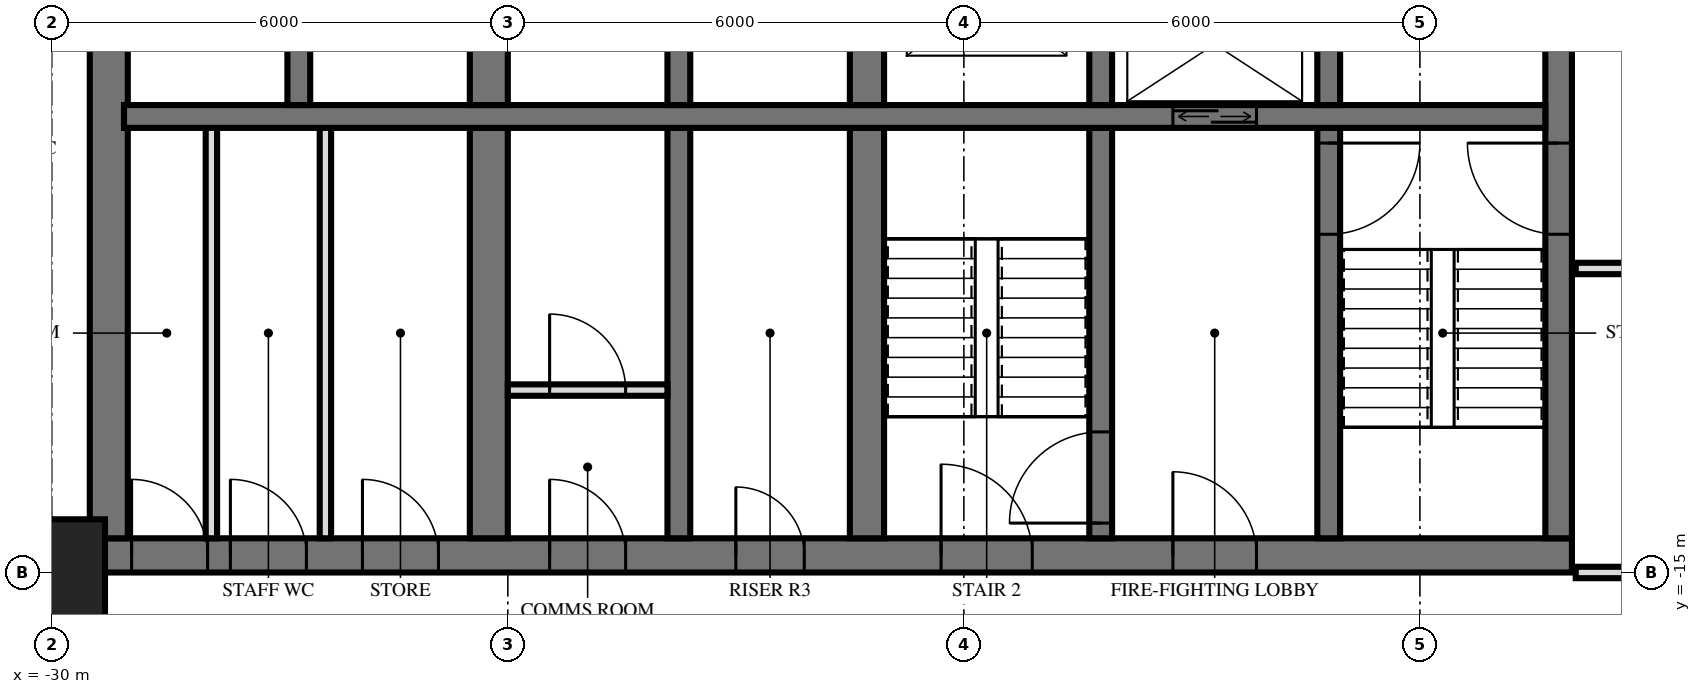
"""IFC4 building model, lengths in metres.
Left out: names, types, materials, properties, quantities, classifications, styles, units other than length and angle.
Written with IfcOpenShell. Run it as: python <this file> out.ifc"""

import sys

from ifc_helpers import new_model, si_unit, direction, frame, frame_2d, origin, origin_2d, place, context, subcontext, project, spatial, rectangle, extrude, element, fill, save


model = new_model("IFC4")
c1 = context("Model", 3, precision=1e-05, world=origin(), true_north=direction((0.0, 1.0)))
c2 = subcontext(c1, "Body", "Model", "MODEL_VIEW")
j1 = project(units=[si_unit("LENGTHUNIT", "METRE"), si_unit("PLANEANGLEUNIT", "RADIAN")], contexts=[c1])
p1 = place(None, origin())
s1 = spatial("IfcSite", under=j1, at=p1, CompositionType="ELEMENT")
p2 = place(p1, origin())
s2 = spatial("IfcBuilding", under=s1, at=p2, CompositionType="ELEMENT")
p3 = place(p2, frame((0.0, 0.0, 88.8)))
s3 = spatial("IfcBuildingStorey", under=s2, at=p3, CompositionType="ELEMENT", Elevation=88.8)
p4 = place(p3, frame((-30.0, -15.0, 0.0), z_axis=(0.0, 0.0, 1.0), x_axis=(1.0, 0.0, 0.0)))
e1 = element("IfcColumn", 1, at=p4, inside=s3, PredefinedType="COLUMN", context=c2, shape_type="SweptSolid", body=[
    extrude(rectangle(XDim=1.4, YDim=1.4, at=origin_2d()), origin(), (0.0, 0.0, 1.0), 3.6),
])
p5 = place(p3, frame((-29.5, -14.775, 0.0), z_axis=(0.0, 0.0, 1.0), x_axis=(1.0, 0.0, 0.0)))
e2 = element("IfcWall", 2, at=p5, inside=s3, PredefinedType="SHEAR", context=c2, shape_type="SweptSolid", body=[
    extrude(rectangle(XDim=19.5, YDim=0.45, at=frame_2d((9.75, 0.0))), origin(), (0.0, 0.0, 1.0), 3.6),
])
p6 = place(p5, frame((11.2, 0.0, 0.0)))
e3 = element("IfcOpeningElement", 3, at=p6, cuts=e2, PredefinedType="OPENING", context=c2, shape_type="SweptSolid", body=[
    extrude(rectangle(XDim=1.2, YDim=2.1, at=frame_2d((0.6, 1.05))), frame((0.0, 0.235, 0.0), z_axis=(0.0, -1.0, 0.0), x_axis=(1.0, 0.0, 0.0)), (0.0, 0.0, 1.0), 0.47),
])
p7 = place(p5, frame((14.25, 0.0, 0.0)))
e4 = element("IfcOpeningElement", 4, at=p7, cuts=e2, PredefinedType="OPENING", context=c2, shape_type="SweptSolid", body=[
    extrude(rectangle(XDim=1.1, YDim=2.1, at=frame_2d((0.55, 1.05))), frame((0.0, 0.235, 0.0), z_axis=(0.0, -1.0, 0.0), x_axis=(1.0, 0.0, 0.0)), (0.0, 0.0, 1.0), 0.47),
])
p8 = place(p5, frame((8.5, 0.0, 0.0)))
e5 = element("IfcOpeningElement", 5, at=p8, cuts=e2, PredefinedType="OPENING", context=c2, shape_type="SweptSolid", body=[
    extrude(rectangle(XDim=0.9, YDim=2.1, at=frame_2d((0.45, 1.05))), frame((0.0, 0.235, 0.0), z_axis=(0.0, -1.0, 0.0), x_axis=(1.0, 0.0, 0.0)), (0.0, 0.0, 1.0), 0.47),
])
p9 = place(p5, frame((6.05, 0.0, 0.0)))
e6 = element("IfcOpeningElement", 6, at=p9, cuts=e2, PredefinedType="OPENING", context=c2, shape_type="SweptSolid", body=[
    extrude(rectangle(XDim=1.0, YDim=2.1, at=frame_2d((0.5, 1.05))), frame((0.0, 0.235, 0.0), z_axis=(0.0, -1.0, 0.0), x_axis=(1.0, 0.0, 0.0)), (0.0, 0.0, 1.0), 0.47),
])
p10 = place(p5, frame((3.587, 0.0, 0.0)))
e7 = element("IfcOpeningElement", 7, at=p10, cuts=e2, PredefinedType="OPENING", context=c2, shape_type="SweptSolid", body=[
    extrude(rectangle(XDim=1.0, YDim=2.1, at=frame_2d((0.5, 1.05))), frame((0.0, 0.235, 0.0), z_axis=(0.0, -1.0, 0.0), x_axis=(1.0, 0.0, 0.0)), (0.0, 0.0, 1.0), 0.47),
])
p11 = place(p5, frame((1.85, 0.0, 0.0)))
e8 = element("IfcOpeningElement", 8, at=p11, cuts=e2, PredefinedType="OPENING", context=c2, shape_type="SweptSolid", body=[
    extrude(rectangle(XDim=1.0, YDim=2.1, at=frame_2d((0.5, 1.05))), frame((0.0, 0.235, 0.0), z_axis=(0.0, -1.0, 0.0), x_axis=(1.0, 0.0, 0.0)), (0.0, 0.0, 1.0), 0.47),
])
p12 = place(p5, frame((0.55, 0.0, 0.0)))
e9 = element("IfcOpeningElement", 9, at=p12, cuts=e2, PredefinedType="OPENING", context=c2, shape_type="SweptSolid", body=[
    extrude(rectangle(XDim=1.0, YDim=2.1, at=frame_2d((0.5, 1.05))), frame((0.0, 0.235, 0.0), z_axis=(0.0, -1.0, 0.0), x_axis=(1.0, 0.0, 0.0)), (0.0, 0.0, 1.0), 0.47),
])
p13 = place(p3, frame((-10.175, -14.55, 0.0), z_axis=(0.0, 0.0, 1.0), x_axis=(0.0, 1.0, 0.0)))
e10 = element("IfcWall", 10, at=p13, inside=s3, PredefinedType="SHEAR", context=c2, shape_type="SweptSolid", body=[
    extrude(rectangle(XDim=14.1, YDim=0.35, at=frame_2d((7.05, 0.0))), origin(), (0.0, 0.0, 1.0), 3.6),
])
p14 = place(p13, frame((8.4, 0.0, 0.0)))
e11 = element("IfcOpeningElement", 11, at=p14, cuts=e10, PredefinedType="OPENING", context=c2, shape_type="SweptSolid", body=[
    extrude(rectangle(XDim=1.4, YDim=2.4, at=frame_2d((0.7, 1.2))), frame((0.0, 0.185, 0.0), z_axis=(0.0, -1.0, 0.0), x_axis=(1.0, 0.0, 0.0)), (0.0, 0.0, 1.0), 0.37),
])
p15 = place(p13, frame((10.0, 0.0, 0.0)))
e12 = element("IfcOpeningElement", 12, at=p15, cuts=e10, PredefinedType="OPENING", context=c2, shape_type="SweptSolid", body=[
    extrude(rectangle(XDim=1.4, YDim=2.4, at=frame_2d((0.7, 1.2))), frame((0.0, 0.185, 0.0), z_axis=(0.0, -1.0, 0.0), x_axis=(1.0, 0.0, 0.0)), (0.0, 0.0, 1.0), 0.37),
])
p16 = place(p13, frame((4.0, 0.0, 0.0)))
e13 = element("IfcOpeningElement", 13, at=p16, cuts=e10, PredefinedType="OPENING", context=c2, shape_type="SweptSolid", body=[
    extrude(rectangle(XDim=1.2, YDim=2.1, at=frame_2d((0.6, 1.05))), frame((0.0, 0.185, 0.0), z_axis=(0.0, -1.0, 0.0), x_axis=(1.0, 0.0, 0.0)), (0.0, 0.0, 1.0), 0.37),
])
p17 = place(p3, frame((-29.25, -14.55, 0.0), z_axis=(0.0, 0.0, 1.0), x_axis=(0.0, 1.0, 0.0)))
e14 = element("IfcWall", 14, at=p17, inside=s3, PredefinedType="SHEAR", context=c2, shape_type="SweptSolid", body=[
    extrude(rectangle(XDim=14.1, YDim=0.5, at=frame_2d((7.05, 0.0))), origin(), (0.0, 0.0, 1.0), 3.6),
])
p18 = place(p3, frame((-29.05, -9.0, 0.0), z_axis=(0.0, 0.0, 1.0), x_axis=(1.0, 0.0, 0.0)))
e15 = element("IfcWall", 15, at=p18, inside=s3, PredefinedType="SHEAR", context=c2, shape_type="SweptSolid", body=[
    extrude(rectangle(XDim=18.7, YDim=0.3, at=frame_2d((9.35, 0.0))), origin(), (0.0, 0.0, 1.0), 3.6),
])
p19 = place(p18, frame((13.8, 0.0, 0.0)))
e16 = element("IfcOpeningElement", 16, at=p19, cuts=e15, PredefinedType="OPENING", context=c2, shape_type="SweptSolid", body=[
    extrude(rectangle(XDim=1.1, YDim=2.1, at=frame_2d((0.55, 1.05))), frame((0.0, 0.16, 0.0), z_axis=(0.0, -1.0, 0.0), x_axis=(1.0, 0.0, 0.0)), (0.0, 0.0, 1.0), 0.32),
])
p20 = place(p3, frame((-13.2, -8.85, 0.0), z_axis=(0.0, 0.0, 1.0), x_axis=(0.0, 1.0, 0.0)))
e17 = element("IfcWall", 17, at=p20, inside=s3, PredefinedType="SHEAR", context=c2, shape_type="SweptSolid", body=[
    extrude(rectangle(XDim=2.3, YDim=0.3, at=frame_2d((1.15, 0.0))), origin(), (0.0, 0.0, 1.0), 3.6),
])
p21 = place(p3, frame((-13.2, -14.55, 0.0), z_axis=(0.0, 0.0, 1.0), x_axis=(0.0, 1.0, 0.0)))
e18 = element("IfcWall", 18, at=p21, inside=s3, PredefinedType="SHEAR", context=c2, shape_type="SweptSolid", body=[
    extrude(rectangle(XDim=5.4, YDim=0.3, at=frame_2d((2.7, 0.0))), origin(), (0.0, 0.0, 1.0), 3.6),
])
p22 = place(p21, frame((4.0, 0.0, 0.0)))
e19 = element("IfcOpeningElement", 19, at=p22, cuts=e18, PredefinedType="OPENING", context=c2, shape_type="SweptSolid", body=[
    extrude(rectangle(XDim=1.2, YDim=2.1, at=frame_2d((0.6, 1.05))), frame((0.0, 0.16, 0.0), z_axis=(0.0, -1.0, 0.0), x_axis=(1.0, 0.0, 0.0)), (0.0, 0.0, 1.0), 0.32),
])
p23 = place(p3, frame((-16.2, -8.85, 0.0), z_axis=(0.0, 0.0, 1.0), x_axis=(0.0, 1.0, 0.0)))
e20 = element("IfcWall", 20, at=p23, inside=s3, PredefinedType="SHEAR", context=c2, shape_type="SweptSolid", body=[
    extrude(rectangle(XDim=2.3, YDim=0.3, at=frame_2d((1.15, 0.0))), origin(), (0.0, 0.0, 1.0), 3.6),
])
p24 = place(p3, frame((-16.2, -14.55, 0.0), z_axis=(0.0, 0.0, 1.0), x_axis=(0.0, 1.0, 0.0)))
e21 = element("IfcWall", 21, at=p24, inside=s3, PredefinedType="SHEAR", context=c2, shape_type="SweptSolid", body=[
    extrude(rectangle(XDim=5.4, YDim=0.3, at=frame_2d((2.7, 0.0))), origin(), (0.0, 0.0, 1.0), 3.6),
])
p25 = place(p24, frame((0.2, 0.0, 0.0)))
e22 = element("IfcOpeningElement", 22, at=p25, cuts=e21, PredefinedType="OPENING", context=c2, shape_type="SweptSolid", body=[
    extrude(rectangle(XDim=1.2, YDim=2.1, at=frame_2d((0.6, 1.05))), frame((0.0, 0.16, 0.0), z_axis=(0.0, -1.0, 0.0), x_axis=(1.0, 0.0, 0.0)), (0.0, 0.0, 1.0), 0.32),
])
p26 = place(p3, frame((-19.275, -8.85, 0.0), z_axis=(0.0, 0.0, 1.0), x_axis=(0.0, 1.0, 0.0)))
e23 = element("IfcWall", 23, at=p26, inside=s3, PredefinedType="SHEAR", context=c2, shape_type="SweptSolid", body=[
    extrude(rectangle(XDim=2.3, YDim=0.45, at=frame_2d((1.15, 0.0))), origin(), (0.0, 0.0, 1.0), 3.6),
])
p27 = place(p3, frame((-19.275, -14.55, 0.0), z_axis=(0.0, 0.0, 1.0), x_axis=(0.0, 1.0, 0.0)))
e24 = element("IfcWall", 24, at=p27, inside=s3, PredefinedType="SHEAR", context=c2, shape_type="SweptSolid", body=[
    extrude(rectangle(XDim=5.4, YDim=0.45, at=frame_2d((2.7, 0.0))), origin(), (0.0, 0.0, 1.0), 3.6),
])
p28 = place(p3, frame((-21.75, -8.85, 0.0), z_axis=(0.0, 0.0, 1.0), x_axis=(0.0, 1.0, 0.0)))
e25 = element("IfcWall", 25, at=p28, inside=s3, PredefinedType="SHEAR", context=c2, shape_type="SweptSolid", body=[
    extrude(rectangle(XDim=2.3, YDim=0.3, at=frame_2d((1.15, 0.0))), origin(), (0.0, 0.0, 1.0), 3.6),
])
p29 = place(p3, frame((-21.75, -14.55, 0.0), z_axis=(0.0, 0.0, 1.0), x_axis=(0.0, 1.0, 0.0)))
e26 = element("IfcWall", 26, at=p29, inside=s3, PredefinedType="SHEAR", context=c2, shape_type="SweptSolid", body=[
    extrude(rectangle(XDim=5.4, YDim=0.3, at=frame_2d((2.7, 0.0))), origin(), (0.0, 0.0, 1.0), 3.6),
])
p30 = place(p3, frame((-24.25, -8.85, 0.0), z_axis=(0.0, 0.0, 1.0), x_axis=(0.0, 1.0, 0.0)))
e27 = element("IfcWall", 27, at=p30, inside=s3, PredefinedType="SHEAR", context=c2, shape_type="SweptSolid", body=[
    extrude(rectangle(XDim=2.3, YDim=0.5, at=frame_2d((1.15, 0.0))), origin(), (0.0, 0.0, 1.0), 3.6),
])
p31 = place(p3, frame((-24.25, -14.55, 0.0), z_axis=(0.0, 0.0, 1.0), x_axis=(0.0, 1.0, 0.0)))
e28 = element("IfcWall", 28, at=p31, inside=s3, PredefinedType="SHEAR", context=c2, shape_type="SweptSolid", body=[
    extrude(rectangle(XDim=5.4, YDim=0.5, at=frame_2d((2.7, 0.0))), origin(), (0.0, 0.0, 1.0), 3.6),
])
p32 = place(p3, frame((-26.75, -8.85, 0.0), z_axis=(0.0, 0.0, 1.0), x_axis=(0.0, 1.0, 0.0)))
e29 = element("IfcWall", 29, at=p32, inside=s3, PredefinedType="SHEAR", context=c2, shape_type="SweptSolid", body=[
    extrude(rectangle(XDim=2.3, YDim=0.3, at=frame_2d((1.15, 0.0))), origin(), (0.0, 0.0, 1.0), 3.6),
])
p33 = place(p3, frame((-24.0, -12.6, 0.0), z_axis=(0.0, 0.0, 1.0), x_axis=(1.0, 0.0, 0.0)))
e30 = element("IfcWall", 30, at=p33, inside=s3, PredefinedType="PARTITIONING", context=c2, shape_type="SweptSolid", body=[
    extrude(rectangle(XDim=2.1, YDim=0.15, at=frame_2d((1.05, 0.0))), origin(), (0.0, 0.0, 1.0), 3.3),
])
p34 = place(p33, frame((0.55, 0.0, 0.0)))
e31 = element("IfcOpeningElement", 31, at=p34, cuts=e30, PredefinedType="OPENING", context=c2, shape_type="SweptSolid", body=[
    extrude(rectangle(XDim=1.0, YDim=2.1, at=frame_2d((0.5, 1.05))), frame((0.0, 0.085, 0.0), z_axis=(0.0, -1.0, 0.0), x_axis=(1.0, 0.0, 0.0)), (0.0, 0.0, 1.0), 0.17),
])
for number, where, z_axis, x_axis in (
    (32, (-26.4, -14.55, 0.0), (0.0, 0.0, 1.0), (0.0, 1.0, 0.0)),
    (33, (-27.9, -14.55, 0.0), (0.0, 0.0, 1.0), (0.0, 1.0, 0.0)),
):
    element("IfcWall", number, at=place(p3, frame(where, z_axis=z_axis, x_axis=x_axis)), inside=s3, PredefinedType="PARTITIONING", context=c2, shape_type="SweptSolid", body=[
        extrude(rectangle(XDim=5.4, YDim=0.15, at=frame_2d((2.7, 0.0))), origin(), (0.0, 0.0, 1.0), 3.3),
    ])
p35 = place(p3, frame((-33.12, -15.0, 0.0), z_axis=(0.0, 0.0, 1.0), x_axis=(1.0, 0.0, 0.0)))
e34 = element("IfcWall", 34, at=p35, inside=s3, PredefinedType="PARTITIONING", context=c2, shape_type="SweptSolid", body=[
    extrude(rectangle(XDim=3.57, YDim=0.15, at=frame_2d((1.785, 0.0))), origin(), (0.0, 0.0, 1.0), 3.32),
])
p36 = place(p35, frame((1.58, 0.0, 0.0)))
e35 = element("IfcOpeningElement", 35, at=p36, cuts=e34, PredefinedType="OPENING", context=c2, shape_type="SweptSolid", body=[
    extrude(rectangle(XDim=0.8, YDim=2.1, at=frame_2d((0.4, 1.05))), frame((0.0, 0.085, 0.0), z_axis=(0.0, -1.0, 0.0), x_axis=(1.0, 0.0, 0.0)), (0.0, 0.0, 1.0), 0.17),
])
p37 = place(p3, frame((-9.95, -15.0, 0.0), z_axis=(0.0, 0.0, 1.0), x_axis=(1.0, 0.0, 0.0)))
e36 = element("IfcWall", 36, at=p37, inside=s3, PredefinedType="PARTITIONING", context=c2, shape_type="SweptSolid", body=[
    extrude(rectangle(XDim=19.9, YDim=0.15, at=frame_2d((9.95, 0.0))), origin(), (0.0, 0.0, 1.0), 2.684),
])
p38 = place(p37, frame((9.45, 0.0, 0.0)))
e37 = element("IfcOpeningElement", 37, at=p38, cuts=e36, PredefinedType="OPENING", context=c2, shape_type="SweptSolid", body=[
    extrude(rectangle(XDim=1.0, YDim=2.1, at=frame_2d((0.5, 1.05))), frame((0.0, 0.085, 0.0), z_axis=(0.0, -1.0, 0.0), x_axis=(1.0, 0.0, 0.0)), (0.0, 0.0, 1.0), 0.17),
])
p39 = place(p3, frame((-9.95, -11.0, 0.0), z_axis=(0.0, 0.0, 1.0), x_axis=(1.0, 0.0, 0.0)))
e38 = element("IfcWall", 38, at=p39, inside=s3, PredefinedType="PARTITIONING", context=c2, shape_type="SweptSolid", body=[
    extrude(rectangle(XDim=19.9, YDim=0.15, at=frame_2d((9.95, 0.0))), origin(), (0.0, 0.0, 1.0), 3.32),
])
p40 = place(p39, frame((9.45, 0.0, 0.0)))
e39 = element("IfcOpeningElement", 39, at=p40, cuts=e38, PredefinedType="OPENING", context=c2, shape_type="SweptSolid", body=[
    extrude(rectangle(XDim=1.0, YDim=2.1, at=frame_2d((0.5, 1.05))), frame((0.0, 0.085, 0.0), z_axis=(0.0, -1.0, 0.0), x_axis=(1.0, 0.0, 0.0)), (0.0, 0.0, 1.0), 0.17),
])
p41 = place(p39, frame((15.45, 0.0, 0.0)))
e40 = element("IfcOpeningElement", 40, at=p41, cuts=e38, PredefinedType="OPENING", context=c2, shape_type="SweptSolid", body=[
    extrude(rectangle(XDim=1.0, YDim=2.1, at=frame_2d((0.5, 1.05))), frame((0.0, 0.085, 0.0), z_axis=(0.0, -1.0, 0.0), x_axis=(1.0, 0.0, 0.0)), (0.0, 0.0, 1.0), 0.17),
])
p42 = place(p19, origin())
e41 = element("IfcDoor", 41, at=p42, inside=s3, OperationType="DOUBLE_DOOR_SLIDING", PredefinedType="USERDEFINED", context=c2, shape_type="SweptSolid", body=[
    extrude(rectangle(XDim=1.1, YDim=2.1, at=frame_2d((0.55, 1.05))), frame((0.0, 0.025, 0.0), z_axis=(0.0, -1.0, 0.0), x_axis=(1.0, 0.0, 0.0)), (0.0, 0.0, 1.0), 0.05),
])
fill(e16, e41)
p43 = place(p16, origin())
e42 = element("IfcDoor", 42, at=p43, inside=s3, OperationType="SINGLE_SWING_LEFT", PredefinedType="DOOR", context=c2, shape_type="SweptSolid", body=[
    extrude(rectangle(XDim=1.2, YDim=2.1, at=frame_2d((0.6, 1.05))), frame((0.0, 0.025, 0.0), z_axis=(0.0, -1.0, 0.0), x_axis=(1.0, 0.0, 0.0)), (0.0, 0.0, 1.0), 0.05),
])
fill(e13, e42)
p44 = place(p6, origin())
e43 = element("IfcDoor", 43, at=p44, inside=s3, OperationType="SINGLE_SWING_RIGHT", PredefinedType="DOOR", context=c2, shape_type="SweptSolid", body=[
    extrude(rectangle(XDim=1.2, YDim=2.1, at=frame_2d((0.6, 1.05))), frame((0.0, 0.025, 0.0), z_axis=(0.0, -1.0, 0.0), x_axis=(1.0, 0.0, 0.0)), (0.0, 0.0, 1.0), 0.05),
])
fill(e3, e43)
p45 = place(p7, origin())
e44 = element("IfcDoor", 44, at=p45, inside=s3, OperationType="SINGLE_SWING_RIGHT", PredefinedType="DOOR", context=c2, shape_type="SweptSolid", body=[
    extrude(rectangle(XDim=1.1, YDim=2.1, at=frame_2d((0.55, 1.05))), frame((0.0, 0.025, 0.0), z_axis=(0.0, -1.0, 0.0), x_axis=(1.0, 0.0, 0.0)), (0.0, 0.0, 1.0), 0.05),
])
fill(e4, e44)
p46 = place(p8, origin())
e45 = element("IfcDoor", 45, at=p46, inside=s3, OperationType="SINGLE_SWING_RIGHT", PredefinedType="DOOR", context=c2, shape_type="SweptSolid", body=[
    extrude(rectangle(XDim=0.9, YDim=2.1, at=frame_2d((0.45, 1.05))), frame((0.0, 0.025, 0.0), z_axis=(0.0, -1.0, 0.0), x_axis=(1.0, 0.0, 0.0)), (0.0, 0.0, 1.0), 0.05),
])
fill(e5, e45)
p47 = place(p9, origin())
e46 = element("IfcDoor", 46, at=p47, inside=s3, OperationType="SINGLE_SWING_RIGHT", PredefinedType="DOOR", context=c2, shape_type="SweptSolid", body=[
    extrude(rectangle(XDim=1.0, YDim=2.1, at=frame_2d((0.5, 1.05))), frame((0.0, 0.025, 0.0), z_axis=(0.0, -1.0, 0.0), x_axis=(1.0, 0.0, 0.0)), (0.0, 0.0, 1.0), 0.05),
])
fill(e6, e46)
p48 = place(p10, origin())
e47 = element("IfcDoor", 47, at=p48, inside=s3, OperationType="SINGLE_SWING_RIGHT", PredefinedType="DOOR", context=c2, shape_type="SweptSolid", body=[
    extrude(rectangle(XDim=1.0, YDim=2.1, at=frame_2d((0.5, 1.05))), frame((0.0, 0.025, 0.0), z_axis=(0.0, -1.0, 0.0), x_axis=(1.0, 0.0, 0.0)), (0.0, 0.0, 1.0), 0.05),
])
fill(e7, e47)
p49 = place(p11, origin())
e48 = element("IfcDoor", 48, at=p49, inside=s3, OperationType="SINGLE_SWING_RIGHT", PredefinedType="DOOR", context=c2, shape_type="SweptSolid", body=[
    extrude(rectangle(XDim=1.0, YDim=2.1, at=frame_2d((0.5, 1.05))), frame((0.0, 0.025, 0.0), z_axis=(0.0, -1.0, 0.0), x_axis=(1.0, 0.0, 0.0)), (0.0, 0.0, 1.0), 0.05),
])
fill(e8, e48)
p50 = place(p12, origin())
e49 = element("IfcDoor", 49, at=p50, inside=s3, OperationType="SINGLE_SWING_RIGHT", PredefinedType="DOOR", context=c2, shape_type="SweptSolid", body=[
    extrude(rectangle(XDim=1.0, YDim=2.1, at=frame_2d((0.5, 1.05))), frame((0.0, 0.025, 0.0), z_axis=(0.0, -1.0, 0.0), x_axis=(1.0, 0.0, 0.0)), (0.0, 0.0, 1.0), 0.05),
])
fill(e9, e49)
p51 = place(p22, frame((0.6, 0.0, 0.0), z_axis=(0.0, 0.0, 1.0), x_axis=(-1.0, 0.0, 0.0)))
e50 = element("IfcDoor", 50, at=p51, inside=s3, OperationType="SINGLE_SWING_RIGHT", PredefinedType="DOOR", context=c2, shape_type="SweptSolid", body=[
    extrude(rectangle(XDim=1.2, YDim=2.1, at=frame_2d((0.0, 1.05))), frame((0.0, -0.025, 0.0), z_axis=(0.0, 1.0, 0.0), x_axis=(-1.0, 0.0, 0.0)), (0.0, 0.0, 1.0), 0.05),
])
fill(e19, e50)
p52 = place(p25, origin())
e51 = element("IfcDoor", 51, at=p52, inside=s3, OperationType="SINGLE_SWING_RIGHT", PredefinedType="DOOR", context=c2, shape_type="SweptSolid", body=[
    extrude(rectangle(XDim=1.2, YDim=2.1, at=frame_2d((0.6, 1.05))), frame((0.0, 0.025, 0.0), z_axis=(0.0, -1.0, 0.0), x_axis=(1.0, 0.0, 0.0)), (0.0, 0.0, 1.0), 0.05),
])
fill(e22, e51)
p53 = place(p34, origin())
e52 = element("IfcDoor", 52, at=p53, inside=s3, OperationType="SINGLE_SWING_RIGHT", PredefinedType="DOOR", context=c2, shape_type="SweptSolid", body=[
    extrude(rectangle(XDim=1.0, YDim=2.1, at=frame_2d((0.5, 1.05))), frame((0.0, 0.025, 0.0), z_axis=(0.0, -1.0, 0.0), x_axis=(1.0, 0.0, 0.0)), (0.0, 0.0, 1.0), 0.05),
])
fill(e31, e52)
save(model, sys.argv[1])
